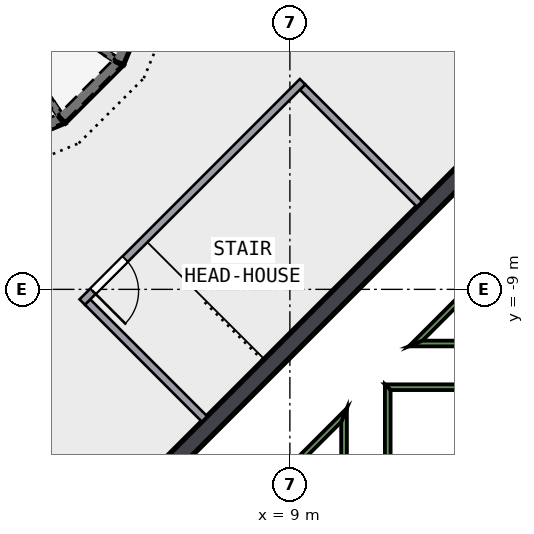
"""IFC4 building model, lengths in metres.
Left out: names, types, materials, properties, quantities, classifications, styles, units other than length and angle.
Written with IfcOpenShell. Run it as: python <this file> out.ifc"""

import sys

from ifc_helpers import new_model, si_unit, direction, frame, frame_2d, origin, place, context, subcontext, project, spatial, polyline, rectangle, outline, extrude, element, fill, save


model = new_model("IFC4")
c1 = context("Model", 3, precision=1e-05, world=origin(), true_north=direction((0.0, 1.0)))
c2 = subcontext(c1, "Body", "Model", "MODEL_VIEW")
j1 = project(units=[si_unit("LENGTHUNIT", "METRE"), si_unit("PLANEANGLEUNIT", "RADIAN")], contexts=[c1])
p1 = place(None, origin())
s1 = spatial("IfcSite", under=j1, at=p1, CompositionType="ELEMENT")
p2 = place(p1, origin())
s2 = spatial("IfcBuilding", under=s1, at=p2, CompositionType="ELEMENT")
p3 = place(p2, frame((0.0, 0.0, 315.0)))
s3 = spatial("IfcBuildingStorey", under=s2, at=p3, CompositionType="ELEMENT", Elevation=315.0)
p4 = place(p3, frame((5.64, -13.841, 0.0), z_axis=(0.0, 0.0, 1.0), x_axis=(0.707106781, 0.707106781, 0.0)))
e1 = element("IfcWall", 1, at=p4, inside=s3, PredefinedType="SHEAR", context=c2, shape_type="SweptSolid", body=[
    extrude(rectangle(XDim=11.598, YDim=0.45, at=frame_2d((5.799, 0.0))), origin(), (0.0, 0.0, 1.0), 7.5),
])
p5 = place(p3, origin())
e2 = element("IfcWall", 2, at=p5, inside=s3, PredefinedType="SOLIDWALL", context=c2, shape_type="SweptSolid", body=[
    extrude(outline(polyline([(1.088, -5.471), (3.099, -4.638), (2.901, -4.342), (1.019, -5.121), (1.088, -5.471)])), origin(), (0.0, 0.0, 1.0), 1.12),
])
p6 = place(p3, origin())
e3 = element("IfcWall", 3, at=p6, inside=s3, PredefinedType="SOLIDWALL", context=c2, shape_type="SweptSolid", body=[
    extrude(outline(polyline([(3.099, -4.638), (4.638, -3.099), (4.342, -2.901), (2.901, -4.342), (3.099, -4.638)])), origin(), (0.0, 0.0, 1.0), 1.12),
])
p7 = place(p3, origin())
e4 = element("IfcWall", 4, at=p7, inside=s3, PredefinedType="SOLIDWALL", context=c2, shape_type="SweptSolid", body=[
    extrude(outline(polyline([(4.638, -3.099), (5.471, -1.088), (5.121, -1.019), (4.342, -2.901), (4.638, -3.099)])), origin(), (0.0, 0.0, 1.0), 1.12),
])
p8 = place(p3, origin())
e5 = element("IfcWall", 5, at=p8, inside=s3, PredefinedType="SOLIDWALL", context=c2, shape_type="SweptSolid", body=[
    extrude(outline(polyline([(19.37, -11.5), (11.5, -11.5), (11.65, -11.65), (19.149, -11.65), (19.37, -11.5)])), origin(), (0.0, 0.0, 1.0), 0.6),
])
p9 = place(p3, origin())
e6 = element("IfcWall", 6, at=p9, inside=s3, PredefinedType="SOLIDWALL", context=c2, shape_type="SweptSolid", body=[
    extrude(outline(polyline([(11.5, -11.5), (11.5, -19.271), (11.65, -18.963), (11.65, -11.65), (11.5, -11.5)])), origin(), (0.0, 0.0, 1.0), 0.6),
])
p10 = place(p3, origin())
e7 = element("IfcWall", 7, at=p10, inside=s3, PredefinedType="SOLIDWALL", context=c2, shape_type="SweptSolid", body=[
    extrude(outline(polyline([(10.5, -20.057), (10.5, -12.127), (10.35, -12.49), (10.35, -19.984), (10.5, -20.057)])), origin(), (0.0, 0.0, 1.0), 0.6),
])
p11 = place(p3, origin())
e8 = element("IfcWall", 8, at=p11, inside=s3, PredefinedType="SOLIDWALL", context=c2, shape_type="SweptSolid", body=[
    extrude(outline(polyline([(10.5, -12.127), (6.627, -16.0), (6.689, -16.15), (10.35, -12.49), (10.5, -12.127)])), origin(), (0.0, 0.0, 1.0), 0.6),
])
p12 = place(p3, origin())
e9 = element("IfcWall", 9, at=p12, inside=s3, PredefinedType="SOLIDWALL", context=c2, shape_type="SweptSolid", body=[
    extrude(outline(polyline([(16.0, -6.627), (12.127, -10.5), (12.49, -10.35), (16.15, -6.689), (16.0, -6.627)])), origin(), (0.0, 0.0, 1.0), 0.6),
])
p13 = place(p3, origin())
e10 = element("IfcWall", 10, at=p13, inside=s3, PredefinedType="SOLIDWALL", context=c2, shape_type="SweptSolid", body=[
    extrude(outline(polyline([(12.127, -10.5), (19.771, -10.5), (19.67, -10.35), (12.49, -10.35), (12.127, -10.5)])), origin(), (0.0, 0.0, 1.0), 0.6),
])
p14 = place(p3, frame((9.334, -3.535, 0.0), z_axis=(0.0, 0.0, 1.0), x_axis=(-0.707106781, -0.707106781, 0.0)))
e11 = element("IfcWall", 11, at=p14, inside=s3, PredefinedType="SOLIDWALL", context=c2, shape_type="SweptSolid", body=[
    extrude(rectangle(XDim=8.2, YDim=0.2, at=frame_2d((4.1, 0.0))), origin(), (0.0, 0.0, 1.0), 3.6),
])
p15 = place(p14, frame((6.6, 0.0, 0.0)))
e12 = element("IfcOpeningElement", 12, at=p15, cuts=e11, PredefinedType="OPENING", context=c2, shape_type="SweptSolid", body=[
    extrude(rectangle(XDim=1.2, YDim=2.1, at=frame_2d((0.6, 1.05))), frame((0.0, 0.11, 0.0), z_axis=(0.0, -1.0, 0.0), x_axis=(1.0, 0.0, 0.0)), (0.0, 0.0, 1.0), 0.22),
])
for number, where, z_axis, x_axis in (
    (13, (3.677, -9.334, 0.0), (0.0, 0.0, 1.0), (0.707, -0.707, 0.0)),
    (14, (9.334, -3.677, 0.0), (0.0, 0.0, 1.0), (0.707, -0.707, 0.0)),
):
    element("IfcWall", number, at=place(p3, frame(where, z_axis=z_axis, x_axis=x_axis)), inside=s3, PredefinedType="SOLIDWALL", context=c2, shape_type="SweptSolid", body=[
        extrude(rectangle(XDim=4.35, YDim=0.2, at=frame_2d((2.175, 0.0))), origin(), (0.0, 0.0, 1.0), 3.6),
    ])
p16 = place(p15, origin())
e15 = element("IfcDoor", 15, at=p16, inside=s3, OperationType="SINGLE_SWING_RIGHT", PredefinedType="DOOR", context=c2, shape_type="SweptSolid", body=[
    extrude(rectangle(XDim=1.2, YDim=2.1, at=frame_2d((0.6, 1.05))), frame((0.0, 0.025, 0.0), z_axis=(0.0, -1.0, 0.0), x_axis=(1.0, 0.0, 0.0)), (0.0, 0.0, 1.0), 0.05),
])
fill(e12, e15)
save(model, sys.argv[1])
